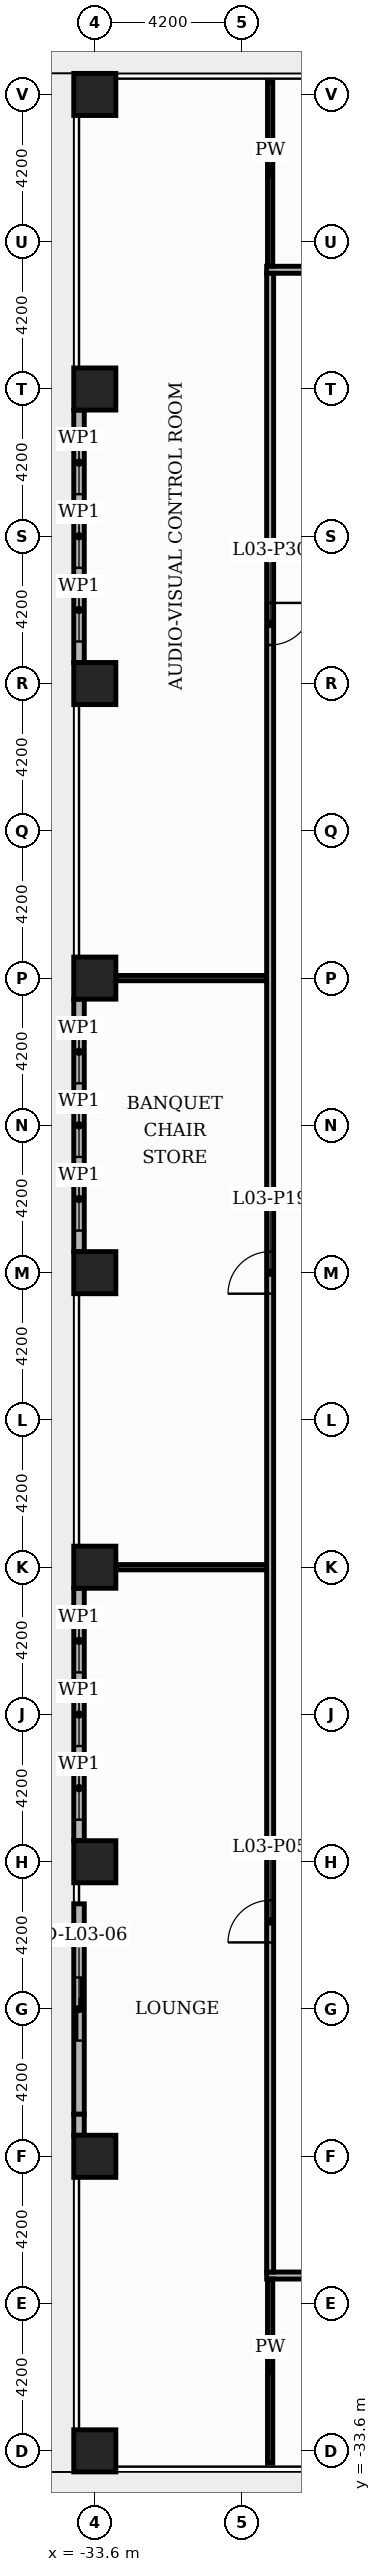
"""IFC4 building model, lengths in metres.
Left out: names, types, materials, properties, quantities, classifications, styles, units other than length and angle.
Written with IfcOpenShell. Run it as: python <this file> out.ifc"""

import sys

from ifc_helpers import new_model, si_unit, direction, frame, frame_2d, origin, origin_2d, place, context, subcontext, project, spatial, rectangle, extrude, element, fill, save


model = new_model("IFC4")
c1 = context("Model", 3, precision=1e-05, world=origin(), true_north=direction((0.0, 1.0)))
c2 = subcontext(c1, "Body", "Model", "MODEL_VIEW")
j1 = project(units=[si_unit("LENGTHUNIT", "METRE"), si_unit("PLANEANGLEUNIT", "RADIAN")], contexts=[c1])
p1 = place(None, origin())
s1 = spatial("IfcSite", under=j1, at=p1, CompositionType="ELEMENT")
p2 = place(p1, origin())
s2 = spatial("IfcBuilding", under=s1, at=p2, CompositionType="ELEMENT")
p3 = place(p2, frame((0.0, 0.0, 16.8)))
s3 = spatial("IfcBuildingStorey", under=s2, at=p3, CompositionType="ELEMENT", Elevation=16.8)
for number, where, z_axis, x_axis in (
    (1, (-33.6, 0.0, 0.0), (0.0, 0.0, 1.0), (1.0, 0.0, 0.0)),
    (2, (-33.6, 8.4, 0.0), (0.0, 0.0, 1.0), (1.0, 0.0, 0.0)),
    (3, (-33.6, 16.8, 0.0), (0.0, 0.0, 1.0), (1.0, 0.0, 0.0)),
    (4, (-33.6, 25.2, 0.0), (0.0, 0.0, 1.0), (1.0, 0.0, 0.0)),
    (5, (-33.6, 33.6, 0.0), (0.0, 0.0, 1.0), (1.0, 0.0, 0.0)),
    (6, (-33.6, -8.4, 0.0), (0.0, 0.0, 1.0), (1.0, 0.0, 0.0)),
    (7, (-33.6, -16.8, 0.0), (0.0, 0.0, 1.0), (1.0, 0.0, 0.0)),
    (8, (-33.6, -25.2, 0.0), (0.0, 0.0, 1.0), (1.0, 0.0, 0.0)),
    (9, (-33.6, -33.6, 0.0), (0.0, 0.0, 1.0), (1.0, 0.0, 0.0)),
):
    element("IfcColumn", number, at=place(p3, frame(where, z_axis=z_axis, x_axis=x_axis)), inside=s3, PredefinedType="COLUMN", context=c2, shape_type="SweptSolid", body=[
        extrude(rectangle(XDim=1.2, YDim=1.2, at=origin_2d()), origin(), (0.0, 0.0, 1.0), 5.4),
    ])
p4 = place(p3, frame((-34.05, 24.6, 0.0), z_axis=(0.0, 0.0, 1.0), x_axis=(0.0, -1.0, 0.0)))
e10 = element("IfcWall", 10, at=p4, inside=s3, PredefinedType="STANDARD", context=c2, shape_type="SweptSolid", body=[
    extrude(rectangle(XDim=7.2, YDim=0.3, at=frame_2d((3.6, 0.0))), origin(), (0.0, 0.0, 1.0), 4.98),
])
p5 = place(p4, frame((0.6, 0.0, 0.6)))
e11 = element("IfcOpeningElement", 11, at=p5, cuts=e10, PredefinedType="OPENING", context=c2, shape_type="SweptSolid", body=[
    extrude(rectangle(XDim=1.8, YDim=3.0, at=frame_2d((0.9, 1.5))), frame((0.0, 0.16, 0.0), z_axis=(0.0, -1.0, 0.0), x_axis=(1.0, 0.0, 0.0)), (0.0, 0.0, 1.0), 0.32),
])
p6 = place(p4, frame((2.7, 0.0, 0.6)))
e12 = element("IfcOpeningElement", 12, at=p6, cuts=e10, PredefinedType="OPENING", context=c2, shape_type="SweptSolid", body=[
    extrude(rectangle(XDim=1.8, YDim=3.0, at=frame_2d((0.9, 1.5))), frame((0.0, 0.16, 0.0), z_axis=(0.0, -1.0, 0.0), x_axis=(1.0, 0.0, 0.0)), (0.0, 0.0, 1.0), 0.32),
])
p7 = place(p4, frame((4.8, 0.0, 0.6)))
e13 = element("IfcOpeningElement", 13, at=p7, cuts=e10, PredefinedType="OPENING", context=c2, shape_type="SweptSolid", body=[
    extrude(rectangle(XDim=1.8, YDim=3.0, at=frame_2d((0.9, 1.5))), frame((0.0, 0.16, 0.0), z_axis=(0.0, -1.0, 0.0), x_axis=(1.0, 0.0, 0.0)), (0.0, 0.0, 1.0), 0.32),
])
p8 = place(p3, frame((-34.05, 7.8, 0.0), z_axis=(0.0, 0.0, 1.0), x_axis=(0.0, -1.0, 0.0)))
e14 = element("IfcWall", 14, at=p8, inside=s3, PredefinedType="STANDARD", context=c2, shape_type="SweptSolid", body=[
    extrude(rectangle(XDim=7.2, YDim=0.3, at=frame_2d((3.6, 0.0))), origin(), (0.0, 0.0, 1.0), 4.98),
])
p9 = place(p8, frame((0.6, 0.0, 0.6)))
e15 = element("IfcOpeningElement", 15, at=p9, cuts=e14, PredefinedType="OPENING", context=c2, shape_type="SweptSolid", body=[
    extrude(rectangle(XDim=1.8, YDim=3.0, at=frame_2d((0.9, 1.5))), frame((0.0, 0.16, 0.0), z_axis=(0.0, -1.0, 0.0), x_axis=(1.0, 0.0, 0.0)), (0.0, 0.0, 1.0), 0.32),
])
p10 = place(p8, frame((2.7, 0.0, 0.6)))
e16 = element("IfcOpeningElement", 16, at=p10, cuts=e14, PredefinedType="OPENING", context=c2, shape_type="SweptSolid", body=[
    extrude(rectangle(XDim=1.8, YDim=3.0, at=frame_2d((0.9, 1.5))), frame((0.0, 0.16, 0.0), z_axis=(0.0, -1.0, 0.0), x_axis=(1.0, 0.0, 0.0)), (0.0, 0.0, 1.0), 0.32),
])
p11 = place(p8, frame((4.8, 0.0, 0.6)))
e17 = element("IfcOpeningElement", 17, at=p11, cuts=e14, PredefinedType="OPENING", context=c2, shape_type="SweptSolid", body=[
    extrude(rectangle(XDim=1.8, YDim=3.0, at=frame_2d((0.9, 1.5))), frame((0.0, 0.16, 0.0), z_axis=(0.0, -1.0, 0.0), x_axis=(1.0, 0.0, 0.0)), (0.0, 0.0, 1.0), 0.32),
])
p12 = place(p3, frame((-34.05, -9.0, 0.0), z_axis=(0.0, 0.0, 1.0), x_axis=(0.0, -1.0, 0.0)))
e18 = element("IfcWall", 18, at=p12, inside=s3, PredefinedType="STANDARD", context=c2, shape_type="SweptSolid", body=[
    extrude(rectangle(XDim=7.2, YDim=0.3, at=frame_2d((3.6, 0.0))), origin(), (0.0, 0.0, 1.0), 4.98),
])
p13 = place(p12, frame((0.6, 0.0, 0.6)))
e19 = element("IfcOpeningElement", 19, at=p13, cuts=e18, PredefinedType="OPENING", context=c2, shape_type="SweptSolid", body=[
    extrude(rectangle(XDim=1.8, YDim=3.0, at=frame_2d((0.9, 1.5))), frame((0.0, 0.16, 0.0), z_axis=(0.0, -1.0, 0.0), x_axis=(1.0, 0.0, 0.0)), (0.0, 0.0, 1.0), 0.32),
])
p14 = place(p12, frame((2.7, 0.0, 0.6)))
e20 = element("IfcOpeningElement", 20, at=p14, cuts=e18, PredefinedType="OPENING", context=c2, shape_type="SweptSolid", body=[
    extrude(rectangle(XDim=1.8, YDim=3.0, at=frame_2d((0.9, 1.5))), frame((0.0, 0.16, 0.0), z_axis=(0.0, -1.0, 0.0), x_axis=(1.0, 0.0, 0.0)), (0.0, 0.0, 1.0), 0.32),
])
p15 = place(p12, frame((4.8, 0.0, 0.6)))
e21 = element("IfcOpeningElement", 21, at=p15, cuts=e18, PredefinedType="OPENING", context=c2, shape_type="SweptSolid", body=[
    extrude(rectangle(XDim=1.8, YDim=3.0, at=frame_2d((0.9, 1.5))), frame((0.0, 0.16, 0.0), z_axis=(0.0, -1.0, 0.0), x_axis=(1.0, 0.0, 0.0)), (0.0, 0.0, 1.0), 0.32),
])
p16 = place(p3, frame((-34.05, -18.0, 0.0), z_axis=(0.0, 0.0, 1.0), x_axis=(0.0, -1.0, 0.0)))
e22 = element("IfcWall", 22, at=p16, inside=s3, PredefinedType="STANDARD", context=c2, shape_type="SweptSolid", body=[
    extrude(rectangle(XDim=6.0, YDim=0.3, at=frame_2d((3.0, 0.0))), origin(), (0.0, 0.0, 1.0), 4.98),
])
p17 = place(p16, frame((2.1, 0.0, 0.0)))
e23 = element("IfcOpeningElement", 23, at=p17, cuts=e22, PredefinedType="OPENING", context=c2, shape_type="SweptSolid", body=[
    extrude(rectangle(XDim=1.8, YDim=2.4, at=frame_2d((0.9, 1.2))), frame((0.0, 0.16, 0.0), z_axis=(0.0, -1.0, 0.0), x_axis=(1.0, 0.0, 0.0)), (0.0, 0.0, 1.0), 0.32),
])
p18 = place(p3, frame((-34.05, -24.0, 0.0), z_axis=(0.0, 0.0, 1.0), x_axis=(0.0, -1.0, 0.0)))
e24 = element("IfcWall", 24, at=p18, inside=s3, PredefinedType="STANDARD", context=c2, shape_type="SweptSolid", body=[
    extrude(rectangle(XDim=0.6, YDim=0.3, at=frame_2d((0.3, 0.0))), origin(), (0.0, 0.0, 1.0), 4.98),
])
p19 = place(p3, frame((-28.7, -28.6, 0.0), z_axis=(0.0, 0.0, 1.0), x_axis=(1.0, 0.0, 0.0)))
e25 = element("IfcWall", 25, at=p19, inside=s3, PredefinedType="PARTITIONING", context=c2, shape_type="SweptSolid", body=[
    extrude(rectangle(XDim=57.4, YDim=0.2, at=frame_2d((28.7, 0.0))), origin(), (0.0, 0.0, 1.0), 4.68),
])
p20 = place(p19, frame((7.5, 0.0, 0.0)))
e26 = element("IfcOpeningElement", 26, at=p20, cuts=e25, PredefinedType="OPENING", context=c2, shape_type="SweptSolid", body=[
    extrude(rectangle(XDim=1.2, YDim=2.2, at=frame_2d((0.6, 1.1))), frame((0.0, 0.11, 0.0), z_axis=(0.0, -1.0, 0.0), x_axis=(1.0, 0.0, 0.0)), (0.0, 0.0, 1.0), 0.22),
])
p21 = place(p19, frame((28.1, 0.0, 0.0)))
e27 = element("IfcOpeningElement", 27, at=p21, cuts=e25, PredefinedType="OPENING", context=c2, shape_type="SweptSolid", body=[
    extrude(rectangle(XDim=1.2, YDim=2.2, at=frame_2d((0.6, 1.1))), frame((0.0, 0.11, 0.0), z_axis=(0.0, -1.0, 0.0), x_axis=(1.0, 0.0, 0.0)), (0.0, 0.0, 1.0), 0.22),
])
p22 = place(p19, frame((48.7, 0.0, 0.0)))
e28 = element("IfcOpeningElement", 28, at=p22, cuts=e25, PredefinedType="OPENING", context=c2, shape_type="SweptSolid", body=[
    extrude(rectangle(XDim=1.2, YDim=2.2, at=frame_2d((0.6, 1.1))), frame((0.0, 0.11, 0.0), z_axis=(0.0, -1.0, 0.0), x_axis=(1.0, 0.0, 0.0)), (0.0, 0.0, 1.0), 0.22),
])
for number, where, z_axis, x_axis in (
    (29, (-33.0, -8.4, 0.0), (0.0, 0.0, 1.0), (1.0, 0.0, 0.0)),
    (30, (-33.0, 8.4, 0.0), (0.0, 0.0, 1.0), (1.0, 0.0, 0.0)),
):
    element("IfcWall", number, at=place(p3, frame(where, z_axis=z_axis, x_axis=x_axis)), inside=s3, PredefinedType="PARTITIONING", context=c2, shape_type="SweptSolid", body=[
        extrude(rectangle(XDim=4.3, YDim=0.15, at=frame_2d((2.15, 0.0))), origin(), (0.0, 0.0, 1.0), 4.78),
    ])
p23 = place(p3, frame((-28.7, 28.6, 0.0), z_axis=(0.0, 0.0, 1.0), x_axis=(1.0, 0.0, 0.0)))
e31 = element("IfcWall", 31, at=p23, inside=s3, PredefinedType="PARTITIONING", context=c2, shape_type="SweptSolid", body=[
    extrude(rectangle(XDim=57.4, YDim=0.2, at=frame_2d((28.7, 0.0))), origin(), (0.0, 0.0, 1.0), 4.68),
])
p24 = place(p23, frame((13.8, 0.0, 0.0)))
e32 = element("IfcOpeningElement", 32, at=p24, cuts=e31, PredefinedType="OPENING", context=c2, shape_type="SweptSolid", body=[
    extrude(rectangle(XDim=1.2, YDim=2.2, at=frame_2d((0.6, 1.1))), frame((0.0, 0.11, 0.0), z_axis=(0.0, -1.0, 0.0), x_axis=(1.0, 0.0, 0.0)), (0.0, 0.0, 1.0), 0.22),
])
p25 = place(p23, frame((42.4, 0.0, 0.0)))
e33 = element("IfcOpeningElement", 33, at=p25, cuts=e31, PredefinedType="OPENING", context=c2, shape_type="SweptSolid", body=[
    extrude(rectangle(XDim=1.2, YDim=2.2, at=frame_2d((0.6, 1.1))), frame((0.0, 0.11, 0.0), z_axis=(0.0, -1.0, 0.0), x_axis=(1.0, 0.0, 0.0)), (0.0, 0.0, 1.0), 0.22),
])
p26 = place(p3, frame((-28.6, -33.95, 0.0), z_axis=(0.0, 0.0, 1.0), x_axis=(0.0, 1.0, 0.0)))
e34 = element("IfcWall", 34, at=p26, inside=s3, PredefinedType="PARTITIONING", context=c2, shape_type="SweptSolid", body=[
    extrude(rectangle(XDim=5.25, YDim=0.15, at=frame_2d((2.625, 0.0))), origin(), (0.0, 0.0, 1.0), 4.78),
])
p27 = place(p3, frame((-28.6, -28.5, 0.0), z_axis=(0.0, 0.0, 1.0), x_axis=(0.0, 1.0, 0.0)))
e35 = element("IfcWall", 35, at=p27, inside=s3, PredefinedType="PARTITIONING", context=c2, shape_type="SweptSolid", body=[
    extrude(rectangle(XDim=57.0, YDim=0.2, at=frame_2d((28.5, 0.0))), origin(), (0.0, 0.0, 1.0), 4.78),
])
p28 = place(p27, frame((9.4, 0.0, 0.0)))
e36 = element("IfcOpeningElement", 36, at=p28, cuts=e35, PredefinedType="OPENING", context=c2, shape_type="SweptSolid", body=[
    extrude(rectangle(XDim=1.2, YDim=2.2, at=frame_2d((0.6, 1.1))), frame((0.0, 0.11, 0.0), z_axis=(0.0, -1.0, 0.0), x_axis=(1.0, 0.0, 0.0)), (0.0, 0.0, 1.0), 0.22),
])
p29 = place(p27, frame((27.9, 0.0, 0.0)))
e37 = element("IfcOpeningElement", 37, at=p29, cuts=e35, PredefinedType="OPENING", context=c2, shape_type="SweptSolid", body=[
    extrude(rectangle(XDim=1.2, YDim=2.2, at=frame_2d((0.6, 1.1))), frame((0.0, 0.11, 0.0), z_axis=(0.0, -1.0, 0.0), x_axis=(1.0, 0.0, 0.0)), (0.0, 0.0, 1.0), 0.22),
])
p30 = place(p27, frame((46.4, 0.0, 0.0)))
e38 = element("IfcOpeningElement", 38, at=p30, cuts=e35, PredefinedType="OPENING", context=c2, shape_type="SweptSolid", body=[
    extrude(rectangle(XDim=1.2, YDim=2.2, at=frame_2d((0.6, 1.1))), frame((0.0, 0.11, 0.0), z_axis=(0.0, -1.0, 0.0), x_axis=(1.0, 0.0, 0.0)), (0.0, 0.0, 1.0), 0.22),
])
p31 = place(p3, frame((-28.6, 28.7, 0.0), z_axis=(0.0, 0.0, 1.0), x_axis=(0.0, 1.0, 0.0)))
e39 = element("IfcWall", 39, at=p31, inside=s3, PredefinedType="PARTITIONING", context=c2, shape_type="SweptSolid", body=[
    extrude(rectangle(XDim=5.25, YDim=0.15, at=frame_2d((2.625, 0.0))), origin(), (0.0, 0.0, 1.0), 4.78),
])
p32 = place(p5, origin())
e40 = element("IfcWindow", 40, at=p32, inside=s3, PartitioningType="SINGLE_PANEL", PredefinedType="WINDOW", context=c2, shape_type="SweptSolid", body=[
    extrude(rectangle(XDim=1.8, YDim=3.0, at=frame_2d((0.9, 1.5))), frame((0.0, 0.03, 0.0), z_axis=(0.0, -1.0, 0.0), x_axis=(1.0, 0.0, 0.0)), (0.0, 0.0, 1.0), 0.06),
])
fill(e11, e40)
p33 = place(p6, origin())
e41 = element("IfcWindow", 41, at=p33, inside=s3, PartitioningType="SINGLE_PANEL", PredefinedType="WINDOW", context=c2, shape_type="SweptSolid", body=[
    extrude(rectangle(XDim=1.8, YDim=3.0, at=frame_2d((0.9, 1.5))), frame((0.0, 0.03, 0.0), z_axis=(0.0, -1.0, 0.0), x_axis=(1.0, 0.0, 0.0)), (0.0, 0.0, 1.0), 0.06),
])
fill(e12, e41)
p34 = place(p7, origin())
e42 = element("IfcWindow", 42, at=p34, inside=s3, PartitioningType="SINGLE_PANEL", PredefinedType="WINDOW", context=c2, shape_type="SweptSolid", body=[
    extrude(rectangle(XDim=1.8, YDim=3.0, at=frame_2d((0.9, 1.5))), frame((0.0, 0.03, 0.0), z_axis=(0.0, -1.0, 0.0), x_axis=(1.0, 0.0, 0.0)), (0.0, 0.0, 1.0), 0.06),
])
fill(e13, e42)
p35 = place(p9, origin())
e43 = element("IfcWindow", 43, at=p35, inside=s3, PartitioningType="SINGLE_PANEL", PredefinedType="WINDOW", context=c2, shape_type="SweptSolid", body=[
    extrude(rectangle(XDim=1.8, YDim=3.0, at=frame_2d((0.9, 1.5))), frame((0.0, 0.03, 0.0), z_axis=(0.0, -1.0, 0.0), x_axis=(1.0, 0.0, 0.0)), (0.0, 0.0, 1.0), 0.06),
])
fill(e15, e43)
p36 = place(p10, origin())
e44 = element("IfcWindow", 44, at=p36, inside=s3, PartitioningType="SINGLE_PANEL", PredefinedType="WINDOW", context=c2, shape_type="SweptSolid", body=[
    extrude(rectangle(XDim=1.8, YDim=3.0, at=frame_2d((0.9, 1.5))), frame((0.0, 0.03, 0.0), z_axis=(0.0, -1.0, 0.0), x_axis=(1.0, 0.0, 0.0)), (0.0, 0.0, 1.0), 0.06),
])
fill(e16, e44)
p37 = place(p11, origin())
e45 = element("IfcWindow", 45, at=p37, inside=s3, PartitioningType="SINGLE_PANEL", PredefinedType="WINDOW", context=c2, shape_type="SweptSolid", body=[
    extrude(rectangle(XDim=1.8, YDim=3.0, at=frame_2d((0.9, 1.5))), frame((0.0, 0.03, 0.0), z_axis=(0.0, -1.0, 0.0), x_axis=(1.0, 0.0, 0.0)), (0.0, 0.0, 1.0), 0.06),
])
fill(e17, e45)
p38 = place(p13, origin())
e46 = element("IfcWindow", 46, at=p38, inside=s3, PartitioningType="SINGLE_PANEL", PredefinedType="WINDOW", context=c2, shape_type="SweptSolid", body=[
    extrude(rectangle(XDim=1.8, YDim=3.0, at=frame_2d((0.9, 1.5))), frame((0.0, 0.03, 0.0), z_axis=(0.0, -1.0, 0.0), x_axis=(1.0, 0.0, 0.0)), (0.0, 0.0, 1.0), 0.06),
])
fill(e19, e46)
p39 = place(p14, origin())
e47 = element("IfcWindow", 47, at=p39, inside=s3, PartitioningType="SINGLE_PANEL", PredefinedType="WINDOW", context=c2, shape_type="SweptSolid", body=[
    extrude(rectangle(XDim=1.8, YDim=3.0, at=frame_2d((0.9, 1.5))), frame((0.0, 0.03, 0.0), z_axis=(0.0, -1.0, 0.0), x_axis=(1.0, 0.0, 0.0)), (0.0, 0.0, 1.0), 0.06),
])
fill(e20, e47)
p40 = place(p15, origin())
e48 = element("IfcWindow", 48, at=p40, inside=s3, PartitioningType="SINGLE_PANEL", PredefinedType="WINDOW", context=c2, shape_type="SweptSolid", body=[
    extrude(rectangle(XDim=1.8, YDim=3.0, at=frame_2d((0.9, 1.5))), frame((0.0, 0.03, 0.0), z_axis=(0.0, -1.0, 0.0), x_axis=(1.0, 0.0, 0.0)), (0.0, 0.0, 1.0), 0.06),
])
fill(e21, e48)
p41 = place(p17, origin())
e49 = element("IfcDoor", 49, at=p41, inside=s3, OperationType="SLIDING_TO_LEFT", PredefinedType="DOOR", context=c2, shape_type="SweptSolid", body=[
    extrude(rectangle(XDim=1.8, YDim=2.4, at=frame_2d((0.9, 1.2))), frame((0.0, 0.025, 0.0), z_axis=(0.0, -1.0, 0.0), x_axis=(1.0, 0.0, 0.0)), (0.0, 0.0, 1.0), 0.05),
])
fill(e23, e49)
p42 = place(p28, origin())
e50 = element("IfcDoor", 50, at=p42, inside=s3, OperationType="SINGLE_SWING_LEFT", PredefinedType="DOOR", context=c2, shape_type="SweptSolid", body=[
    extrude(rectangle(XDim=1.2, YDim=2.2, at=frame_2d((0.6, 1.1))), frame((0.0, 0.025, 0.0), z_axis=(0.0, -1.0, 0.0), x_axis=(1.0, 0.0, 0.0)), (0.0, 0.0, 1.0), 0.05),
])
fill(e36, e50)
p43 = place(p29, origin())
e51 = element("IfcDoor", 51, at=p43, inside=s3, OperationType="SINGLE_SWING_LEFT", PredefinedType="DOOR", context=c2, shape_type="SweptSolid", body=[
    extrude(rectangle(XDim=1.2, YDim=2.2, at=frame_2d((0.6, 1.1))), frame((0.0, 0.025, 0.0), z_axis=(0.0, -1.0, 0.0), x_axis=(1.0, 0.0, 0.0)), (0.0, 0.0, 1.0), 0.05),
])
fill(e37, e51)
p44 = place(p30, origin())
e52 = element("IfcDoor", 52, at=p44, inside=s3, OperationType="SINGLE_SWING_RIGHT", PredefinedType="DOOR", context=c2, shape_type="SweptSolid", body=[
    extrude(rectangle(XDim=1.2, YDim=2.2, at=frame_2d((0.6, 1.1))), frame((0.0, 0.025, 0.0), z_axis=(0.0, -1.0, 0.0), x_axis=(1.0, 0.0, 0.0)), (0.0, 0.0, 1.0), 0.05),
])
fill(e38, e52)
save(model, sys.argv[1])
